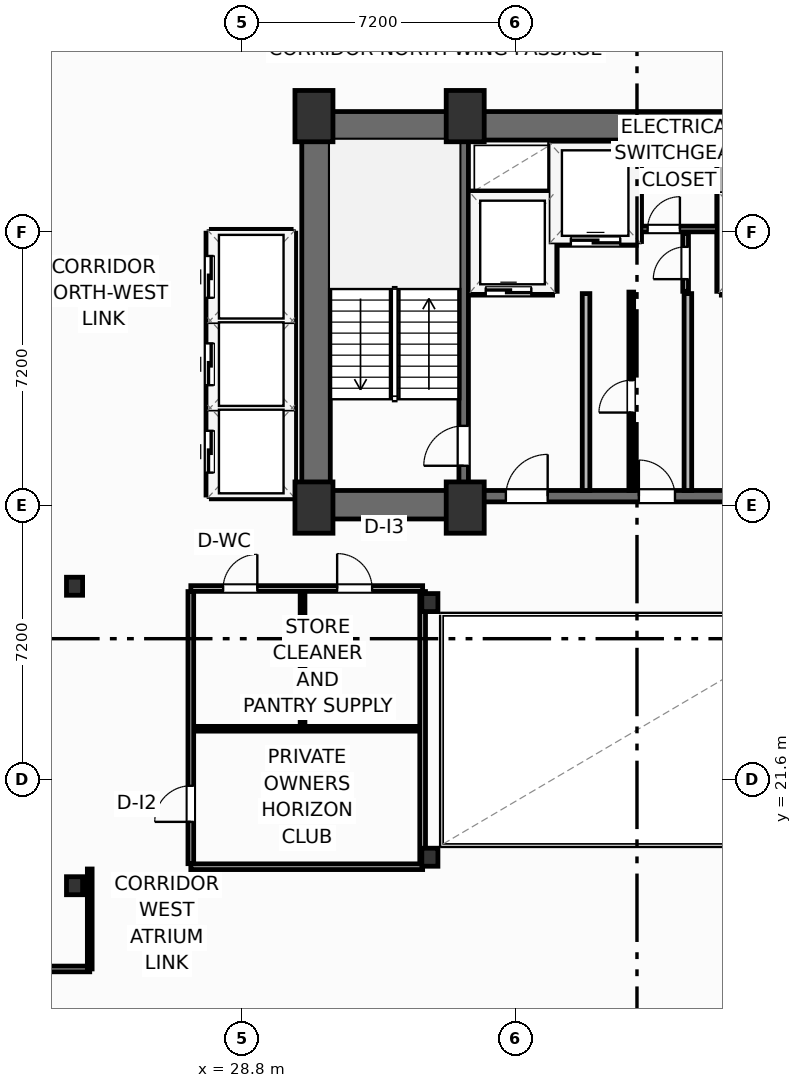
"""IFC4 building model, lengths in metres.
Left out: names, types, materials, properties, quantities, classifications, styles, units other than length and angle.
Written with IfcOpenShell. Run it as: python <this file> out.ifc"""

import sys

from ifc_helpers import new_model, si_unit, direction, frame, frame_2d, origin, origin_2d, place, context, subcontext, project, spatial, rectangle, i_section, extrude, element, fill, save


model = new_model("IFC4")
c1 = context("Model", 3, precision=1e-05, world=origin(), true_north=direction((0.0, 1.0)))
c2 = subcontext(c1, "Body", "Model", "MODEL_VIEW")
j1 = project(units=[si_unit("LENGTHUNIT", "METRE"), si_unit("PLANEANGLEUNIT", "RADIAN")], contexts=[c1])
p1 = place(None, origin())
s1 = spatial("IfcSite", under=j1, at=p1, CompositionType="ELEMENT")
p2 = place(p1, origin())
s2 = spatial("IfcBuilding", under=s1, at=p2, CompositionType="ELEMENT")
p3 = place(p2, frame((0.0, 0.0, 113.2)))
s3 = spatial("IfcBuildingStorey", under=s2, at=p3, CompositionType="ELEMENT", Elevation=113.2)
for number, where, z_axis, x_axis in (
    (1, (30.7, 28.75, 0.0), (0.0, 0.0, 1.0), (1.0, 0.0, 0.0)),
    (2, (34.68, 28.75, 0.0), (0.0, 0.0, 1.0), (1.0, 0.0, 0.0)),
    (3, (30.7, 39.05, 0.0), (0.0, 0.0, 1.0), (1.0, 0.0, 0.0)),
    (4, (34.68, 39.05, 0.0), (0.0, 0.0, 1.0), (1.0, 0.0, 0.0)),
):
    element("IfcColumn", number, at=place(p3, frame(where, z_axis=z_axis, x_axis=x_axis)), inside=s3, PredefinedType="COLUMN", context=c2, shape_type="SweptSolid", body=[
        extrude(rectangle(XDim=1.0, YDim=1.35, at=origin_2d()), origin(), (0.0, 0.0, 1.0), 3.7),
    ])
for number, where, z_axis, x_axis in (
    (5, (33.75, 19.55, 0.0), (0.0, 0.0, 1.0), (1.0, 0.0, 0.0)),
    (6, (33.75, 26.25, 0.0), (0.0, 0.0, 1.0), (1.0, 0.0, 0.0)),
    (7, (24.4, 18.8, 0.0), (0.0, 0.0, 1.0), (1.0, 0.0, 0.0)),
    (8, (24.4, 26.68, 0.0), (0.0, 0.0, 1.0), (1.0, 0.0, 0.0)),
):
    element("IfcColumn", number, at=place(p3, frame(where, z_axis=z_axis, x_axis=x_axis)), inside=s3, PredefinedType="COLUMN", context=c2, shape_type="SweptSolid", body=[
        extrude(i_section(OverallWidth=0.424, OverallDepth=0.474, WebThickness=0.048, FlangeThickness=0.077, FilletRadius=0.025, at=origin_2d()), origin(), (0.0, 0.0, 1.0), 3.7),
    ])
p4 = place(p3, frame((30.38, 38.795, 0.0), z_axis=(0.0, 0.0, 1.0), x_axis=(1.0, 0.0, 0.0)))
e9 = element("IfcWall", 9, at=p4, inside=s3, PredefinedType="SHEAR", context=c2, shape_type="SweptSolid", body=[
    extrude(rectangle(XDim=17.64, YDim=0.75, at=frame_2d((8.82, 0.0))), origin(), (0.0, 0.0, 1.0), 3.38),
])
p5 = place(p3, frame((30.755, 29.2, 0.0), z_axis=(0.0, 0.0, 1.0), x_axis=(0.0, 1.0, 0.0)))
e10 = element("IfcWall", 10, at=p5, inside=s3, PredefinedType="SHEAR", context=c2, shape_type="SweptSolid", body=[
    extrude(rectangle(XDim=9.22, YDim=0.75, at=frame_2d((4.61, 0.0))), origin(), (0.0, 0.0, 1.0), 3.38),
])
p6 = place(p3, frame((30.38, 28.825, 0.0), z_axis=(0.0, 0.0, 1.0), x_axis=(1.0, 0.0, 0.0)))
e11 = element("IfcWall", 11, at=p6, inside=s3, PredefinedType="SHEAR", context=c2, shape_type="SweptSolid", body=[
    extrude(rectangle(XDim=4.42, YDim=0.75, at=frame_2d((2.21, 0.0))), origin(), (0.0, 0.0, 1.0), 3.38),
])
p7 = place(p3, frame((34.8, 29.05, 0.0), z_axis=(0.0, 0.0, 1.0), x_axis=(1.0, 0.0, 0.0)))
e12 = element("IfcWall", 12, at=p7, inside=s3, PredefinedType="SHEAR", context=c2, shape_type="SweptSolid", body=[
    extrude(rectangle(XDim=8.8, YDim=0.3, at=frame_2d((4.4, 0.0))), origin(), (0.0, 0.0, 1.0), 3.38),
])
p8 = place(p7, frame((0.95, 0.0, 0.0)))
e13 = element("IfcOpeningElement", 13, at=p8, cuts=e12, PredefinedType="OPENING", context=c2, shape_type="SweptSolid", body=[
    extrude(rectangle(XDim=1.1, YDim=2.15, at=frame_2d((0.55, 1.075))), frame((0.0, 0.16, 0.0), z_axis=(0.0, -1.0, 0.0), x_axis=(1.0, 0.0, 0.0)), (0.0, 0.0, 1.0), 0.32),
])
p9 = place(p7, frame((6.75, 0.0, 0.0)))
e14 = element("IfcOpeningElement", 14, at=p9, cuts=e12, PredefinedType="OPENING", context=c2, shape_type="SweptSolid", body=[
    extrude(rectangle(XDim=1.1, YDim=2.15, at=frame_2d((0.55, 1.075))), frame((0.0, 0.16, 0.0), z_axis=(0.0, -1.0, 0.0), x_axis=(1.0, 0.0, 0.0)), (0.0, 0.0, 1.0), 0.32),
])
p10 = place(p7, frame((4.45, 0.0, 0.0)))
e15 = element("IfcOpeningElement", 15, at=p10, cuts=e12, PredefinedType="OPENING", context=c2, shape_type="SweptSolid", body=[
    extrude(rectangle(XDim=0.95, YDim=2.15, at=frame_2d((0.475, 1.075))), frame((0.0, 0.16, 0.0), z_axis=(0.0, -1.0, 0.0), x_axis=(1.0, 0.0, 0.0)), (0.0, 0.0, 1.0), 0.32),
])
p11 = place(p3, frame((34.64, 29.2, 0.0), z_axis=(0.0, 0.0, 1.0), x_axis=(0.0, 1.0, 0.0)))
e16 = element("IfcWall", 16, at=p11, inside=s3, PredefinedType="SHEAR", context=c2, shape_type="SweptSolid", body=[
    extrude(rectangle(XDim=9.22, YDim=0.25, at=frame_2d((4.61, 0.0))), origin(), (0.0, 0.0, 1.0), 3.38),
])
p12 = place(p11, frame((0.65, 0.0, 0.0)))
e17 = element("IfcOpeningElement", 17, at=p12, cuts=e16, PredefinedType="OPENING", context=c2, shape_type="SweptSolid", body=[
    extrude(rectangle(XDim=1.05, YDim=2.15, at=frame_2d((0.525, 1.075))), frame((0.0, 0.135, 0.0), z_axis=(0.0, -1.0, 0.0), x_axis=(1.0, 0.0, 0.0)), (0.0, 0.0, 1.0), 0.27),
])
p13 = place(p3, frame((5.0, 16.61, 0.0), z_axis=(0.0, 0.0, 1.0), x_axis=(1.0, 0.0, 0.0)))
e18 = element("IfcWall", 18, at=p13, inside=s3, PredefinedType="PARTITIONING", context=c2, shape_type="SweptSolid", body=[
    extrude(rectangle(XDim=19.8, YDim=0.15, at=frame_2d((9.9, 0.0))), origin(), (0.0, 0.0, 1.0), 3.38),
])
p14 = place(p13, frame((11.66, 0.0, 0.0)))
e19 = element("IfcOpeningElement", 19, at=p14, cuts=e18, PredefinedType="OPENING", context=c2, shape_type="SweptSolid", body=[
    extrude(rectangle(XDim=0.92, YDim=2.05, at=frame_2d((0.46, 1.025))), frame((0.0, 0.085, 0.0), z_axis=(0.0, -1.0, 0.0), x_axis=(1.0, 0.0, 0.0)), (0.0, 0.0, 1.0), 0.17),
])
p15 = place(p3, frame((24.8, 16.61, 0.0), z_axis=(0.0, 0.0, 1.0), x_axis=(0.0, 1.0, 0.0)))
e20 = element("IfcWall", 20, at=p15, inside=s3, PredefinedType="PARTITIONING", context=c2, shape_type="SweptSolid", body=[
    extrude(rectangle(XDim=2.63, YDim=0.125, at=frame_2d((1.315, 0.0))), origin(), (0.0, 0.0, 1.0), 1.165),
])
for number, where, z_axis, x_axis in (
    (21, (37.86, 29.2, 0.0), (0.0, 0.0, 1.0), (0.0, 1.0, 0.0)),
    (22, (40.54, 29.2, 0.0), (0.0, 0.0, 1.0), (0.0, 1.0, 0.0)),
):
    element("IfcWall", number, at=place(p3, frame(where, z_axis=z_axis, x_axis=x_axis)), inside=s3, PredefinedType="PARTITIONING", context=c2, shape_type="SweptSolid", body=[
        extrude(rectangle(XDim=5.18, YDim=0.2, at=frame_2d((2.59, 0.0))), origin(), (0.0, 0.0, 1.0), 3.38),
    ])
p16 = place(p3, frame((34.8, 34.44, 0.0), z_axis=(0.0, 0.0, 1.0), x_axis=(1.0, 0.0, 0.0)))
e23 = element("IfcWall", 23, at=p16, inside=s3, PredefinedType="PARTITIONING", context=c2, shape_type="SweptSolid", body=[
    extrude(rectangle(XDim=2.18, YDim=0.2, at=frame_2d((1.09, 0.0))), origin(), (0.0, 0.0, 1.0), 3.38),
])
p17 = place(p16, frame((0.42, 0.0, 0.0)))
e24 = element("IfcOpeningElement", 24, at=p17, cuts=e23, PredefinedType="OPENING", context=c2, shape_type="SweptSolid", body=[
    extrude(rectangle(XDim=1.2, YDim=2.2, at=frame_2d((0.6, 1.1))), frame((0.0, 0.11, 0.0), z_axis=(0.0, -1.0, 0.0), x_axis=(1.0, 0.0, 0.0)), (0.0, 0.0, 1.0), 0.22),
])
p18 = place(p3, frame((34.8, 36.98, 0.0), z_axis=(0.0, 0.0, 1.0), x_axis=(1.0, 0.0, 0.0)))
e25 = element("IfcWall", 25, at=p18, inside=s3, PredefinedType="PARTITIONING", context=c2, shape_type="SweptSolid", body=[
    extrude(rectangle(XDim=2.18, YDim=0.2, at=frame_2d((1.09, 0.0))), origin(), (0.0, 0.0, 1.0), 3.38),
])
for number, where, z_axis, x_axis in (
    (26, (37.0, 34.44, 0.0), (0.0, 0.0, 1.0), (0.0, 1.0, 0.0)),
    (27, (41.4, 34.44, 0.0), (0.0, 0.0, 1.0), (0.0, 1.0, 0.0)),
):
    element("IfcWall", number, at=place(p3, frame(where, z_axis=z_axis, x_axis=x_axis)), inside=s3, PredefinedType="PARTITIONING", context=c2, shape_type="SweptSolid", body=[
        extrude(rectangle(XDim=3.9, YDim=0.2, at=frame_2d((1.95, 0.0))), origin(), (0.0, 0.0, 1.0), 3.38),
    ])
p19 = place(p3, frame((37.06, 35.75, 0.0), z_axis=(0.0, 0.0, 1.0), x_axis=(1.0, 0.0, 0.0)))
e28 = element("IfcWall", 28, at=p19, inside=s3, PredefinedType="PARTITIONING", context=c2, shape_type="SweptSolid", body=[
    extrude(rectangle(XDim=2.12, YDim=0.2, at=frame_2d((1.06, 0.0))), origin(), (0.0, 0.0, 1.0), 3.38),
])
p20 = place(p19, frame((0.4, 0.0, 0.0)))
e29 = element("IfcOpeningElement", 29, at=p20, cuts=e28, PredefinedType="OPENING", context=c2, shape_type="SweptSolid", body=[
    extrude(rectangle(XDim=1.3, YDim=2.2, at=frame_2d((0.65, 1.1))), frame((0.0, 0.11, 0.0), z_axis=(0.0, -1.0, 0.0), x_axis=(1.0, 0.0, 0.0)), (0.0, 0.0, 1.0), 0.22),
])
p21 = place(p3, frame((39.22, 35.75, 0.0), z_axis=(0.0, 0.0, 1.0), x_axis=(0.0, 1.0, 0.0)))
e30 = element("IfcWall", 30, at=p21, inside=s3, PredefinedType="PARTITIONING", context=c2, shape_type="SweptSolid", body=[
    extrude(rectangle(XDim=2.59, YDim=0.2, at=frame_2d((1.295, 0.0))), origin(), (0.0, 0.0, 1.0), 3.38),
])
p22 = place(p3, frame((39.3, 36.08, 0.0), z_axis=(0.0, 0.0, 1.0), x_axis=(1.0, 0.0, 0.0)))
e31 = element("IfcWall", 31, at=p22, inside=s3, PredefinedType="PARTITIONING", context=c2, shape_type="SweptSolid", body=[
    extrude(rectangle(XDim=2.02, YDim=0.15, at=frame_2d((1.01, 0.0))), origin(), (0.0, 0.0, 1.0), 3.38),
])
p23 = place(p22, frame((0.18, 0.0, 0.0)))
e32 = element("IfcOpeningElement", 32, at=p23, cuts=e31, PredefinedType="OPENING", context=c2, shape_type="SweptSolid", body=[
    extrude(rectangle(XDim=0.85, YDim=2.05, at=frame_2d((0.425, 1.025))), frame((0.0, 0.085, 0.0), z_axis=(0.0, -1.0, 0.0), x_axis=(1.0, 0.0, 0.0)), (0.0, 0.0, 1.0), 0.17),
])
p24 = place(p3, frame((40.48, 34.44, 0.0), z_axis=(0.0, 0.0, 1.0), x_axis=(0.0, 1.0, 0.0)))
e33 = element("IfcWall", 33, at=p24, inside=s3, PredefinedType="PARTITIONING", context=c2, shape_type="SweptSolid", body=[
    extrude(rectangle(XDim=1.52, YDim=0.15, at=frame_2d((0.76, 0.0))), origin(), (0.0, 0.0, 1.0), 3.38),
])
p25 = place(p24, frame((0.32, 0.0, 0.0)))
e34 = element("IfcOpeningElement", 34, at=p25, cuts=e33, PredefinedType="OPENING", context=c2, shape_type="SweptSolid", body=[
    extrude(rectangle(XDim=0.85, YDim=2.05, at=frame_2d((0.425, 1.025))), frame((0.0, 0.085, 0.0), z_axis=(0.0, -1.0, 0.0), x_axis=(1.0, 0.0, 0.0)), (0.0, 0.0, 1.0), 0.17),
])
p26 = place(p3, frame((39.05, 29.2, 0.0), z_axis=(0.0, 0.0, 1.0), x_axis=(0.0, 1.0, 0.0)))
e35 = element("IfcWall", 35, at=p26, inside=s3, PredefinedType="PARTITIONING", context=c2, shape_type="SweptSolid", body=[
    extrude(rectangle(XDim=5.22, YDim=0.125, at=frame_2d((2.61, 0.0))), origin(), (0.0, 0.0, 1.0), 3.38),
])
p27 = place(p26, frame((2.05, 0.0, 0.0)))
e36 = element("IfcOpeningElement", 36, at=p27, cuts=e35, PredefinedType="OPENING", context=c2, shape_type="SweptSolid", body=[
    extrude(rectangle(XDim=0.85, YDim=2.05, at=frame_2d((0.425, 1.025))), frame((0.0, 0.073, 0.0), z_axis=(0.0, -1.0, 0.0), x_axis=(1.0, 0.0, 0.0)), (0.0, 0.0, 1.0), 0.145),
])
p28 = place(p3, frame((27.46, 19.3, 0.0), z_axis=(0.0, 0.0, 1.0), x_axis=(1.0, 0.0, 0.0)))
e37 = element("IfcWall", 37, at=p28, inside=s3, PredefinedType="PARTITIONING", context=c2, shape_type="SweptSolid", body=[
    extrude(rectangle(XDim=6.1, YDim=0.15, at=frame_2d((3.05, 0.0))), origin(), (0.0, 0.0, 1.0), 2.592),
])
p29 = place(p3, frame((27.46, 26.62, 0.0), z_axis=(0.0, 0.0, 1.0), x_axis=(1.0, 0.0, 0.0)))
e38 = element("IfcWall", 38, at=p29, inside=s3, PredefinedType="PARTITIONING", context=c2, shape_type="SweptSolid", body=[
    extrude(rectangle(XDim=6.1, YDim=0.15, at=frame_2d((3.05, 0.0))), origin(), (0.0, 0.0, 1.0), 2.592),
])
p30 = place(p29, frame((0.85, 0.0, 0.0)))
e39 = element("IfcOpeningElement", 39, at=p30, cuts=e38, PredefinedType="OPENING", context=c2, shape_type="SweptSolid", body=[
    extrude(rectangle(XDim=0.9, YDim=2.05, at=frame_2d((0.45, 1.025))), frame((0.0, 0.085, 0.0), z_axis=(0.0, -1.0, 0.0), x_axis=(1.0, 0.0, 0.0)), (0.0, 0.0, 1.0), 0.17),
])
p31 = place(p29, frame((3.85, 0.0, 0.0)))
e40 = element("IfcOpeningElement", 40, at=p31, cuts=e38, PredefinedType="OPENING", context=c2, shape_type="SweptSolid", body=[
    extrude(rectangle(XDim=0.92, YDim=2.05, at=frame_2d((0.46, 1.025))), frame((0.0, 0.085, 0.0), z_axis=(0.0, -1.0, 0.0), x_axis=(1.0, 0.0, 0.0)), (0.0, 0.0, 1.0), 0.17),
])
p32 = place(p3, frame((27.52, 22.93, 0.0), z_axis=(0.0, 0.0, 1.0), x_axis=(1.0, 0.0, 0.0)))
e41 = element("IfcWall", 41, at=p32, inside=s3, PredefinedType="PARTITIONING", context=c2, shape_type="SweptSolid", body=[
    extrude(rectangle(XDim=6.0, YDim=0.125, at=frame_2d((3.0, 0.0))), origin(), (0.0, 0.0, 1.0), 3.38),
])
p33 = place(p3, frame((30.4, 23.0, 0.0), z_axis=(0.0, 0.0, 1.0), x_axis=(0.0, 1.0, 0.0)))
e42 = element("IfcWall", 42, at=p33, inside=s3, PredefinedType="PARTITIONING", context=c2, shape_type="SweptSolid", body=[
    extrude(rectangle(XDim=3.54, YDim=0.125, at=frame_2d((1.77, 0.0))), origin(), (0.0, 0.0, 1.0), 3.38),
])
p34 = place(p3, frame((27.46, 19.38, 0.0), z_axis=(0.0, 0.0, 1.0), x_axis=(0.0, 1.0, 0.0)))
e43 = element("IfcWall", 43, at=p34, inside=s3, PredefinedType="PARTITIONING", context=c2, shape_type="SweptSolid", body=[
    extrude(rectangle(XDim=7.16, YDim=0.15, at=frame_2d((3.58, 0.0))), origin(), (0.0, 0.0, 1.0), 3.38),
])
p35 = place(p34, frame((1.1, 0.0, 0.0)))
e44 = element("IfcOpeningElement", 44, at=p35, cuts=e43, PredefinedType="OPENING", context=c2, shape_type="SweptSolid", body=[
    extrude(rectangle(XDim=0.95, YDim=2.05, at=frame_2d((0.475, 1.025))), frame((0.0, 0.085, 0.0), z_axis=(0.0, -1.0, 0.0), x_axis=(1.0, 0.0, 0.0)), (0.0, 0.0, 1.0), 0.17),
])
p36 = place(p3, frame((33.56, 19.38, 0.0), z_axis=(0.0, 0.0, 1.0), x_axis=(0.0, 1.0, 0.0)))
e45 = element("IfcWall", 45, at=p36, inside=s3, PredefinedType="PARTITIONING", context=c2, shape_type="SweptSolid", body=[
    extrude(rectangle(XDim=7.16, YDim=0.15, at=frame_2d((3.58, 0.0))), origin(), (0.0, 0.0, 1.0), 1.165),
])
for number, where, z_axis, x_axis in (
    (46, (28.02, 31.375, 0.0), (0.0, 0.0, 1.0), (1.0, 0.0, 0.0)),
    (47, (28.02, 33.675, 0.0), (0.0, 0.0, 1.0), (1.0, 0.0, 0.0)),
):
    element("IfcWall", number, at=place(p3, frame(where, z_axis=z_axis, x_axis=x_axis)), inside=s3, PredefinedType="PARTITIONING", context=c2, shape_type="SweptSolid", body=[
        extrude(rectangle(XDim=2.06, YDim=0.2, at=frame_2d((1.03, 0.0))), origin(), (0.0, 0.0, 1.0), 3.38),
    ])
for number, where, z_axis, x_axis in (
    (48, (28.0, 29.08, 0.0), (0.0, 0.0, 1.0), (1.0, 0.0, 0.0)),
    (49, (28.0, 35.97, 0.0), (0.0, 0.0, 1.0), (1.0, 0.0, 0.0)),
):
    element("IfcWall", number, at=place(p3, frame(where, z_axis=z_axis, x_axis=x_axis)), inside=s3, PredefinedType="PARTITIONING", context=c2, shape_type="SweptSolid", body=[
        extrude(rectangle(XDim=2.1, YDim=0.2, at=frame_2d((1.05, 0.0))), origin(), (0.0, 0.0, 1.0), 3.38),
    ])
p37 = place(p3, frame((30.12, 29.08, 0.0), z_axis=(0.0, 0.0, 1.0), x_axis=(0.0, 1.0, 0.0)))
e50 = element("IfcWall", 50, at=p37, inside=s3, PredefinedType="PARTITIONING", context=c2, shape_type="SweptSolid", body=[
    extrude(rectangle(XDim=6.89, YDim=0.2, at=frame_2d((3.445, 0.0))), origin(), (0.0, 0.0, 1.0), 3.38),
])
p38 = place(p3, frame((27.96, 29.08, 0.0), z_axis=(0.0, 0.0, 1.0), x_axis=(0.0, 1.0, 0.0)))
e51 = element("IfcWall", 51, at=p38, inside=s3, PredefinedType="PARTITIONING", context=c2, shape_type="SweptSolid", body=[
    extrude(rectangle(XDim=6.89, YDim=0.2, at=frame_2d((3.445, 0.0))), origin(), (0.0, 0.0, 1.0), 3.38),
])
p39 = place(p38, frame((0.59, 0.0, 0.0)))
e52 = element("IfcOpeningElement", 52, at=p39, cuts=e51, PredefinedType="OPENING", context=c2, shape_type="SweptSolid", body=[
    extrude(rectangle(XDim=1.1, YDim=2.15, at=frame_2d((0.55, 1.075))), frame((0.0, 0.11, 0.0), z_axis=(0.0, -1.0, 0.0), x_axis=(1.0, 0.0, 0.0)), (0.0, 0.0, 1.0), 0.22),
])
p40 = place(p38, frame((2.89, 0.0, 0.0)))
e53 = element("IfcOpeningElement", 53, at=p40, cuts=e51, PredefinedType="OPENING", context=c2, shape_type="SweptSolid", body=[
    extrude(rectangle(XDim=1.1, YDim=2.15, at=frame_2d((0.55, 1.075))), frame((0.0, 0.11, 0.0), z_axis=(0.0, -1.0, 0.0), x_axis=(1.0, 0.0, 0.0)), (0.0, 0.0, 1.0), 0.22),
])
p41 = place(p38, frame((5.19, 0.0, 0.0)))
e54 = element("IfcOpeningElement", 54, at=p41, cuts=e51, PredefinedType="OPENING", context=c2, shape_type="SweptSolid", body=[
    extrude(rectangle(XDim=1.1, YDim=2.15, at=frame_2d((0.55, 1.075))), frame((0.0, 0.11, 0.0), z_axis=(0.0, -1.0, 0.0), x_axis=(1.0, 0.0, 0.0)), (0.0, 0.0, 1.0), 0.22),
])
p42 = place(p12, origin())
e55 = element("IfcDoor", 55, at=p42, inside=s3, OperationType="SINGLE_SWING_LEFT", PredefinedType="DOOR", context=c2, shape_type="SweptSolid", body=[
    extrude(rectangle(XDim=1.05, YDim=2.15, at=frame_2d((0.525, 1.075))), frame((0.0, 0.025, 0.0), z_axis=(0.0, -1.0, 0.0), x_axis=(1.0, 0.0, 0.0)), (0.0, 0.0, 1.0), 0.05),
])
fill(e17, e55)
p43 = place(p8, origin())
e56 = element("IfcDoor", 56, at=p43, inside=s3, OperationType="SINGLE_SWING_RIGHT", PredefinedType="DOOR", context=c2, shape_type="SweptSolid", body=[
    extrude(rectangle(XDim=1.1, YDim=2.15, at=frame_2d((0.55, 1.075))), frame((0.0, 0.025, 0.0), z_axis=(0.0, -1.0, 0.0), x_axis=(1.0, 0.0, 0.0)), (0.0, 0.0, 1.0), 0.05),
])
fill(e13, e56)
p44 = place(p17, origin())
e57 = element("IfcDoor", 57, at=p44, inside=s3, OperationType="SLIDING_TO_LEFT", PredefinedType="DOOR", context=c2, shape_type="SweptSolid", body=[
    extrude(rectangle(XDim=1.2, YDim=2.2, at=frame_2d((0.6, 1.1))), frame((0.0, 0.025, 0.0), z_axis=(0.0, -1.0, 0.0), x_axis=(1.0, 0.0, 0.0)), (0.0, 0.0, 1.0), 0.05),
])
fill(e24, e57)
p45 = place(p20, origin())
e58 = element("IfcDoor", 58, at=p45, inside=s3, OperationType="SLIDING_TO_LEFT", PredefinedType="DOOR", context=c2, shape_type="SweptSolid", body=[
    extrude(rectangle(XDim=1.3, YDim=2.2, at=frame_2d((0.65, 1.1))), frame((0.0, 0.025, 0.0), z_axis=(0.0, -1.0, 0.0), x_axis=(1.0, 0.0, 0.0)), (0.0, 0.0, 1.0), 0.05),
])
fill(e29, e58)
p46 = place(p23, origin())
e59 = element("IfcDoor", 59, at=p46, inside=s3, OperationType="SINGLE_SWING_RIGHT", PredefinedType="DOOR", context=c2, shape_type="SweptSolid", body=[
    extrude(rectangle(XDim=0.85, YDim=2.05, at=frame_2d((0.425, 1.025))), frame((0.0, 0.025, 0.0), z_axis=(0.0, -1.0, 0.0), x_axis=(1.0, 0.0, 0.0)), (0.0, 0.0, 1.0), 0.05),
])
fill(e32, e59)
p47 = place(p25, origin())
e60 = element("IfcDoor", 60, at=p47, inside=s3, OperationType="SINGLE_SWING_LEFT", PredefinedType="DOOR", context=c2, shape_type="SweptSolid", body=[
    extrude(rectangle(XDim=0.85, YDim=2.05, at=frame_2d((0.425, 1.025))), frame((0.0, 0.025, 0.0), z_axis=(0.0, -1.0, 0.0), x_axis=(1.0, 0.0, 0.0)), (0.0, 0.0, 1.0), 0.05),
])
fill(e34, e60)
p48 = place(p27, origin())
e61 = element("IfcDoor", 61, at=p48, inside=s3, OperationType="SINGLE_SWING_LEFT", PredefinedType="DOOR", context=c2, shape_type="SweptSolid", body=[
    extrude(rectangle(XDim=0.85, YDim=2.05, at=frame_2d((0.425, 1.025))), frame((0.0, 0.025, 0.0), z_axis=(0.0, -1.0, 0.0), x_axis=(1.0, 0.0, 0.0)), (0.0, 0.0, 1.0), 0.05),
])
fill(e36, e61)
p49 = place(p10, origin())
e62 = element("IfcDoor", 62, at=p49, inside=s3, OperationType="SINGLE_SWING_LEFT", PredefinedType="DOOR", context=c2, shape_type="SweptSolid", body=[
    extrude(rectangle(XDim=0.95, YDim=2.15, at=frame_2d((0.475, 1.075))), frame((0.0, 0.025, 0.0), z_axis=(0.0, -1.0, 0.0), x_axis=(1.0, 0.0, 0.0)), (0.0, 0.0, 1.0), 0.05),
])
fill(e15, e62)
p50 = place(p30, origin())
e63 = element("IfcDoor", 63, at=p50, inside=s3, OperationType="SINGLE_SWING_RIGHT", PredefinedType="DOOR", context=c2, shape_type="SweptSolid", body=[
    extrude(rectangle(XDim=0.9, YDim=2.05, at=frame_2d((0.45, 1.025))), frame((0.0, 0.025, 0.0), z_axis=(0.0, -1.0, 0.0), x_axis=(1.0, 0.0, 0.0)), (0.0, 0.0, 1.0), 0.05),
])
fill(e39, e63)
p51 = place(p31, origin())
e64 = element("IfcDoor", 64, at=p51, inside=s3, OperationType="SINGLE_SWING_LEFT", PredefinedType="DOOR", context=c2, shape_type="SweptSolid", body=[
    extrude(rectangle(XDim=0.92, YDim=2.05, at=frame_2d((0.46, 1.025))), frame((0.0, 0.025, 0.0), z_axis=(0.0, -1.0, 0.0), x_axis=(1.0, 0.0, 0.0)), (0.0, 0.0, 1.0), 0.05),
])
fill(e40, e64)
p52 = place(p35, origin())
e65 = element("IfcDoor", 65, at=p52, inside=s3, OperationType="SINGLE_SWING_LEFT", PredefinedType="DOOR", context=c2, shape_type="SweptSolid", body=[
    extrude(rectangle(XDim=0.95, YDim=2.05, at=frame_2d((0.475, 1.025))), frame((0.0, 0.025, 0.0), z_axis=(0.0, -1.0, 0.0), x_axis=(1.0, 0.0, 0.0)), (0.0, 0.0, 1.0), 0.05),
])
fill(e44, e65)
p53 = place(p39, origin())
e66 = element("IfcDoor", 66, at=p53, inside=s3, OperationType="SLIDING_TO_LEFT", PredefinedType="DOOR", context=c2, shape_type="SweptSolid", body=[
    extrude(rectangle(XDim=1.1, YDim=2.15, at=frame_2d((0.55, 1.075))), frame((0.0, 0.025, 0.0), z_axis=(0.0, -1.0, 0.0), x_axis=(1.0, 0.0, 0.0)), (0.0, 0.0, 1.0), 0.05),
])
fill(e52, e66)
p54 = place(p40, origin())
e67 = element("IfcDoor", 67, at=p54, inside=s3, OperationType="SLIDING_TO_LEFT", PredefinedType="DOOR", context=c2, shape_type="SweptSolid", body=[
    extrude(rectangle(XDim=1.1, YDim=2.15, at=frame_2d((0.55, 1.075))), frame((0.0, 0.025, 0.0), z_axis=(0.0, -1.0, 0.0), x_axis=(1.0, 0.0, 0.0)), (0.0, 0.0, 1.0), 0.05),
])
fill(e53, e67)
p55 = place(p41, origin())
e68 = element("IfcDoor", 68, at=p55, inside=s3, OperationType="SLIDING_TO_LEFT", PredefinedType="DOOR", context=c2, shape_type="SweptSolid", body=[
    extrude(rectangle(XDim=1.1, YDim=2.15, at=frame_2d((0.55, 1.075))), frame((0.0, 0.025, 0.0), z_axis=(0.0, -1.0, 0.0), x_axis=(1.0, 0.0, 0.0)), (0.0, 0.0, 1.0), 0.05),
])
fill(e54, e68)
save(model, sys.argv[1])
